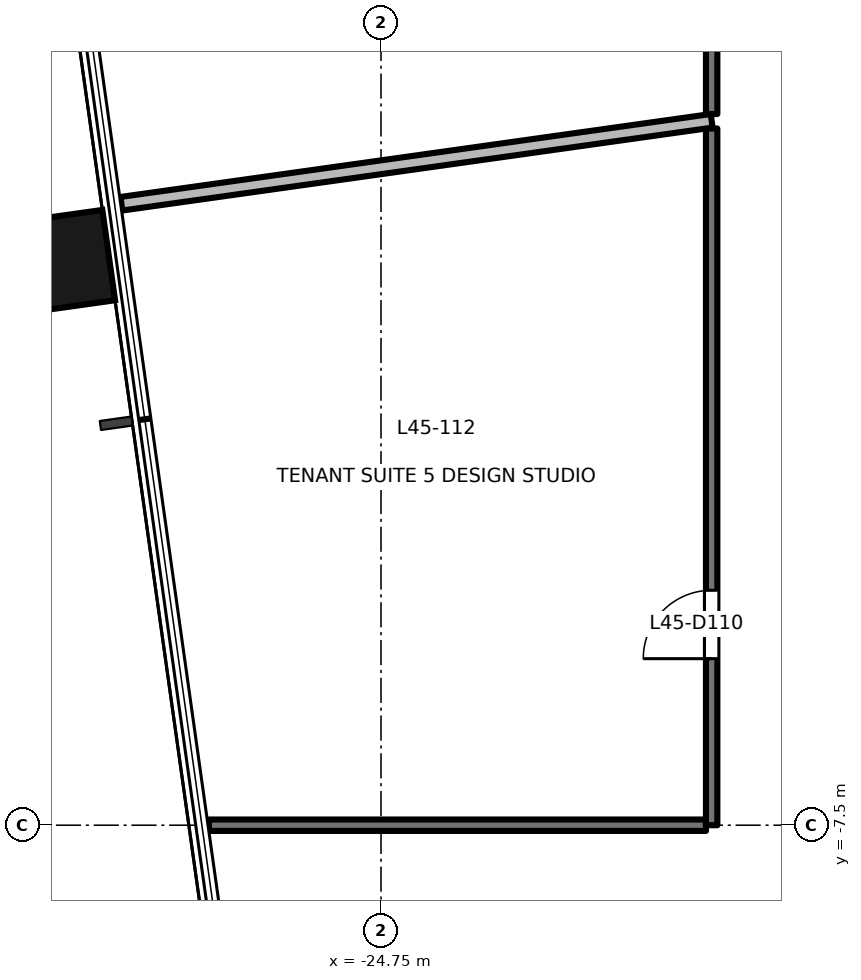
"""IFC4 building model, lengths in metres.
Left out: names, types, materials, properties, quantities, classifications, styles, units other than length and angle.
Written with IfcOpenShell. Run it as: python <this file> out.ifc"""

import sys

from ifc_helpers import new_model, si_unit, direction, frame, frame_2d, origin, origin_2d, place, context, subcontext, project, spatial, rectangle, extrude, element, fill, save


model = new_model("IFC4")
c1 = context("Model", 3, precision=1e-05, world=origin(), true_north=direction((0.0, 1.0)))
c2 = subcontext(c1, "Body", "Model", "MODEL_VIEW")
j1 = project(units=[si_unit("LENGTHUNIT", "METRE"), si_unit("PLANEANGLEUNIT", "RADIAN")], contexts=[c1])
p1 = place(None, origin())
s1 = spatial("IfcSite", under=j1, at=p1, CompositionType="ELEMENT")
p2 = place(p1, origin())
s2 = spatial("IfcBuilding", under=s1, at=p2, CompositionType="ELEMENT")
p3 = place(p2, frame((0.0, 0.0, 195.8)))
s3 = spatial("IfcBuildingStorey", under=s2, at=p3, CompositionType="ELEMENT", Elevation=195.8)
p4 = place(p3, frame((-29.224, -0.125, -0.2), z_axis=(0.0, 0.0, 1.0), x_axis=(-0.139190384377, 0.990265639562, 0.0)))
e1 = element("IfcColumn", 1, at=p4, inside=s3, PredefinedType="COLUMN", context=c2, shape_type="SweptSolid", body=[
    extrude(rectangle(XDim=1.2, YDim=1.8, at=origin_2d()), origin(), (0.0, 0.0, 1.0), 3.9),
])
p5 = place(p3, frame((-27.015, -7.5, 0.0), z_axis=(0.0, 0.0, 1.0), x_axis=(1.0, 0.0, 0.0)))
e2 = element("IfcWall", 2, at=p5, inside=s3, PredefinedType="PARTITIONING", context=c2, shape_type="SweptSolid", body=[
    extrude(rectangle(XDim=6.54, YDim=0.15, at=frame_2d((3.27, 0.0))), origin(), (0.0, 0.0, 1.0), 3.7),
])
p6 = place(p3, frame((-20.4, -7.5, 0.0), z_axis=(0.0, 0.0, 1.0), x_axis=(0.0, 1.0, 0.0)))
e3 = element("IfcWall", 3, at=p6, inside=s3, PredefinedType="PARTITIONING", context=c2, shape_type="SweptSolid", body=[
    extrude(rectangle(XDim=9.166, YDim=0.15, at=frame_2d((4.583, 0.0))), origin(), (0.0, 0.0, 1.0), 3.2),
])
p7 = place(p6, frame((2.191, 0.0, 0.0)))
e4 = element("IfcOpeningElement", 4, at=p7, cuts=e3, PredefinedType="OPENING", context=c2, shape_type="SweptSolid", body=[
    extrude(rectangle(XDim=0.9, YDim=2.1, at=frame_2d((0.45, 1.05))), frame((0.0, 0.085, 0.0), z_axis=(0.0, -1.0, 0.0), x_axis=(1.0, 0.0, 0.0)), (0.0, 0.0, 1.0), 0.171),
])
p8 = place(p3, frame((-20.4, 1.856, 0.0), z_axis=(0.0, 0.0, 1.0), x_axis=(0.0, 1.0, 0.0)))
e5 = element("IfcWall", 5, at=p8, inside=s3, PredefinedType="PARTITIONING", context=c2, shape_type="SweptSolid", body=[
    extrude(rectangle(XDim=3.644, YDim=0.15, at=frame_2d((1.822, 0.0))), origin(), (0.0, 0.0, 1.0), 3.2),
])
p9 = place(p8, frame((0.922, 0.0, 0.0)))
e6 = element("IfcOpeningElement", 6, at=p9, cuts=e5, PredefinedType="OPENING", context=c2, shape_type="SweptSolid", body=[
    extrude(rectangle(XDim=1.8, YDim=2.1, at=frame_2d((0.9, 1.05))), frame((0.0, 0.085, 0.0), z_axis=(0.0, -1.0, 0.0), x_axis=(1.0, 0.0, 0.0)), (0.0, 0.0, 1.0), 0.171),
])
p10 = place(p3, frame((-28.166, 0.676, 0.0), z_axis=(0.0, 0.0, 1.0), x_axis=(0.990274949164, 0.139124135423, 0.0)))
e7 = element("IfcWall", 7, at=p10, inside=s3, PredefinedType="PARTITIONING", context=c2, shape_type="SweptSolid", body=[
    extrude(rectangle(XDim=7.842, YDim=0.18, at=frame_2d((3.921, 0.0))), origin(), (0.0, 0.0, 1.0), 3.7),
])
p11 = place(p7, origin())
e8 = element("IfcDoor", 8, at=p11, inside=s3, OperationType="SINGLE_SWING_LEFT", PredefinedType="DOOR", context=c2, shape_type="SweptSolid", body=[
    extrude(rectangle(XDim=0.9, YDim=2.1, at=frame_2d((0.45, 1.05))), frame((0.0, 0.025, 0.0), z_axis=(0.0, -1.0, 0.0), x_axis=(1.0, 0.0, 0.0)), (0.0, 0.0, 1.0), 0.05),
])
fill(e4, e8)
save(model, sys.argv[1])
